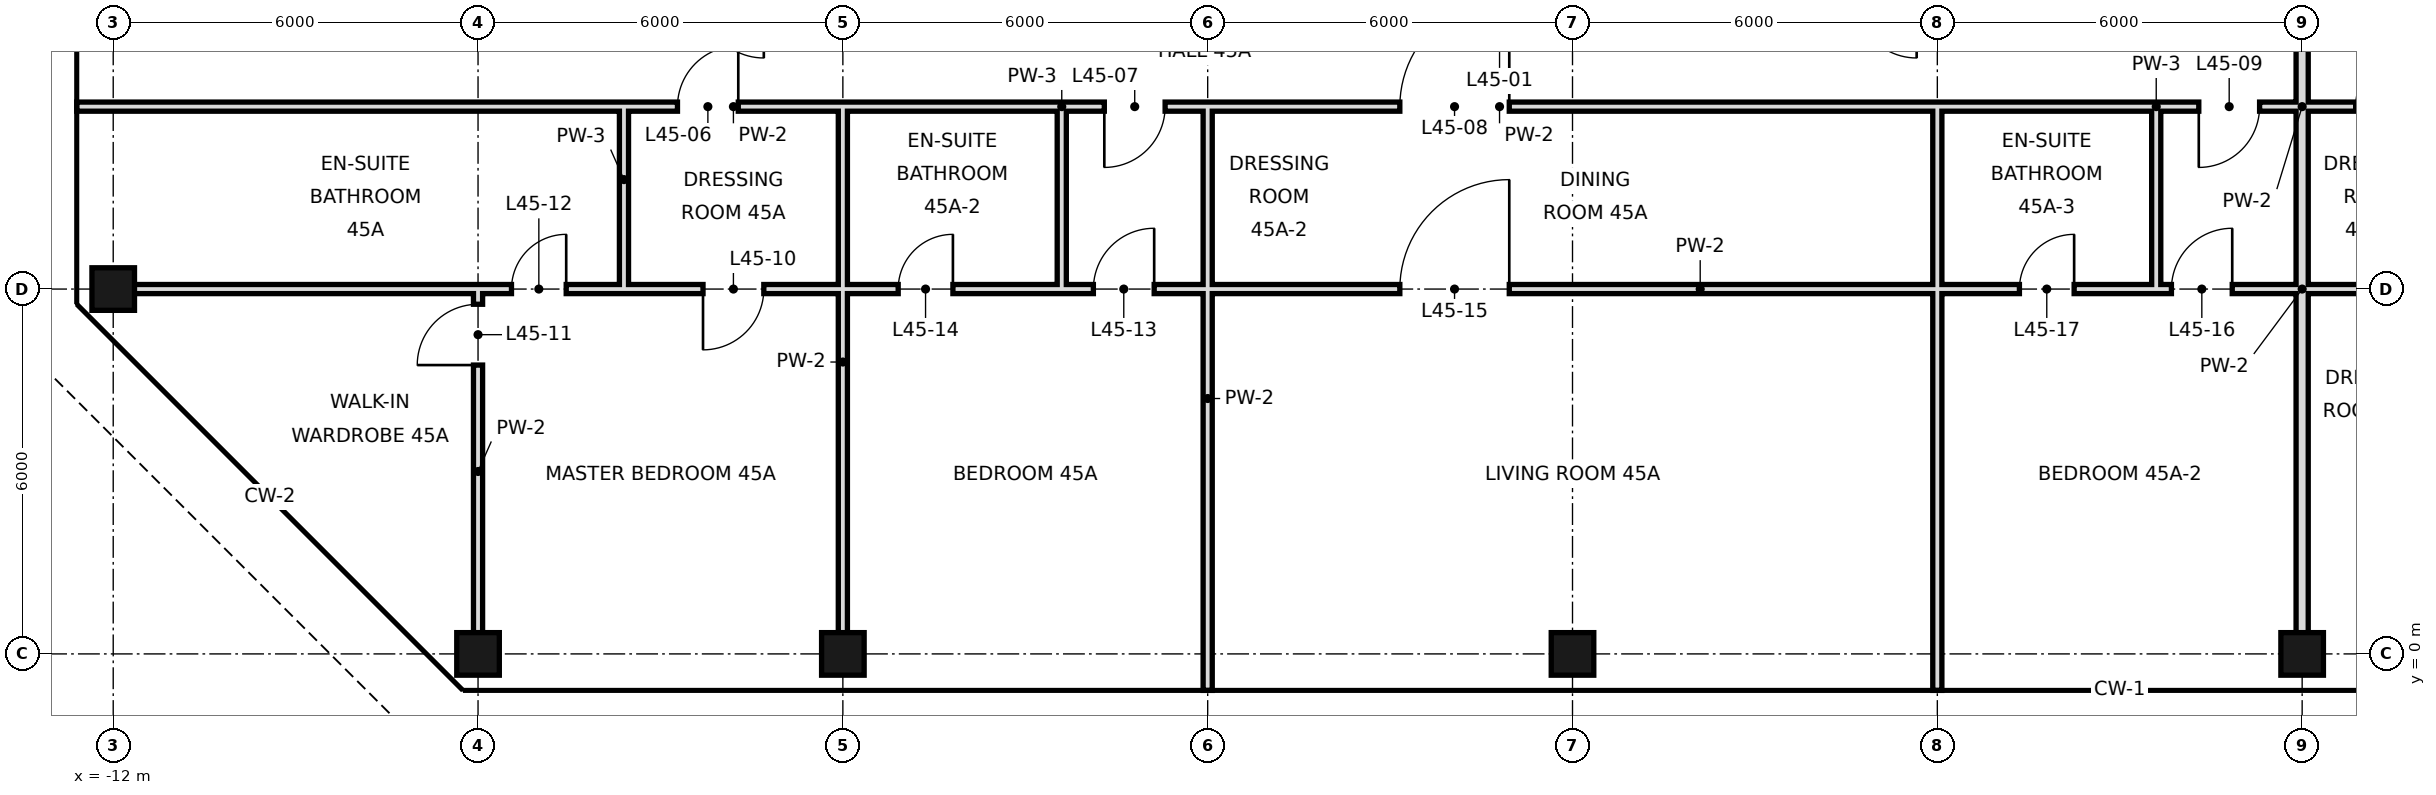
"""IFC4 building model, lengths in metres.
Left out: names, types, materials, properties, quantities, classifications, styles, units other than length and angle.
Written with IfcOpenShell. Run it as: python <this file> out.ifc"""

import sys

from ifc_helpers import new_model, si_unit, direction, frame, frame_2d, origin, origin_2d, place, context, subcontext, project, spatial, rectangle, hollow_rectangle, extrude, element, fill, save


model = new_model("IFC4")
c1 = context("Model", 3, precision=1e-05, world=origin(), true_north=direction((0.0, 1.0)))
c2 = subcontext(c1, "Body", "Model", "MODEL_VIEW")
j1 = project(units=[si_unit("LENGTHUNIT", "METRE"), si_unit("PLANEANGLEUNIT", "RADIAN")], contexts=[c1])
p1 = place(None, origin())
s1 = spatial("IfcSite", under=j1, at=p1, CompositionType="ELEMENT")
p2 = place(p1, origin())
s2 = spatial("IfcBuilding", under=s1, at=p2, CompositionType="ELEMENT")
p3 = place(p2, frame((0.0, 0.0, 195.6)))
s3 = spatial("IfcBuildingStorey", under=s2, at=p3, CompositionType="ELEMENT", Elevation=195.6)
for number, where, z_axis, x_axis in (
    (1, (-12.0, 6.0, 0.0), (0.0, 0.0, 1.0), (1.0, 0.0, 0.0)),
    (2, (-6.0, 0.0, 0.0), (0.0, 0.0, 1.0), (1.0, 0.0, 0.0)),
    (3, (0.0, 0.0, 0.0), (0.0, 0.0, 1.0), (1.0, 0.0, 0.0)),
    (4, (12.0, 0.0, 0.0), (0.0, 0.0, 1.0), (1.0, 0.0, 0.0)),
    (5, (24.0, 0.0, 0.0), (0.0, 0.0, 1.0), (1.0, 0.0, 0.0)),
):
    element("IfcColumn", number, at=place(p3, frame(where, z_axis=z_axis, x_axis=x_axis)), inside=s3, PredefinedType="COLUMN", context=c2, shape_type="SweptSolid", body=[
        extrude(hollow_rectangle(XDim=0.7, YDim=0.7, WallThickness=0.036, at=origin_2d()), origin(), (0.0, 0.0, 1.0), 3.6),
    ])
p4 = place(p3, frame((-3.6, 6.0, 0.0), z_axis=(0.0, 0.0, 1.0), x_axis=(0.0, 1.0, 0.0)))
e6 = element("IfcWall", 6, at=p4, inside=s3, PredefinedType="PARTITIONING", context=c2, shape_type="SweptSolid", body=[
    extrude(rectangle(XDim=3.0, YDim=0.15, at=frame_2d((1.5, 0.0))), origin(), (0.0, 0.0, 1.0), 3.42),
])
p5 = place(p3, frame((-6.0, 0.0, 0.0), z_axis=(0.0, 0.0, 1.0), x_axis=(0.0, 1.0, 0.0)))
e7 = element("IfcWall", 7, at=p5, inside=s3, PredefinedType="PARTITIONING", context=c2, shape_type="SweptSolid", body=[
    extrude(rectangle(XDim=6.0, YDim=0.15, at=frame_2d((3.0, 0.0))), origin(), (0.0, 0.0, 1.0), 3.42),
])
p6 = place(p5, frame((4.75, 0.0, 0.0)))
e8 = element("IfcOpeningElement", 8, at=p6, cuts=e7, PredefinedType="OPENING", context=c2, shape_type="SweptSolid", body=[
    extrude(rectangle(XDim=1.0, YDim=2.4, at=frame_2d((0.5, 1.2))), frame((0.0, 0.085, 0.0), z_axis=(0.0, -1.0, 0.0), x_axis=(1.0, 0.0, 0.0)), (0.0, 0.0, 1.0), 0.17),
])
p7 = place(p3, frame((0.0, 0.0, 0.0), z_axis=(0.0, 0.0, 1.0), x_axis=(0.0, 1.0, 0.0)))
e9 = element("IfcWall", 9, at=p7, inside=s3, PredefinedType="PARTITIONING", context=c2, shape_type="SweptSolid", body=[
    extrude(rectangle(XDim=6.0, YDim=0.15, at=frame_2d((3.0, 0.0))), origin(), (0.0, 0.0, 1.0), 2.72),
])
p8 = place(p3, frame((0.0, 6.0, 0.0), z_axis=(0.0, 0.0, 1.0), x_axis=(0.0, 1.0, 0.0)))
e10 = element("IfcWall", 10, at=p8, inside=s3, PredefinedType="PARTITIONING", context=c2, shape_type="SweptSolid", body=[
    extrude(rectangle(XDim=3.0, YDim=0.15, at=frame_2d((1.5, 0.0))), origin(), (0.0, 0.0, 1.0), 2.72),
])
p9 = place(p3, frame((18.0, -0.6, 0.0), z_axis=(0.0, 0.0, 1.0), x_axis=(0.0, 1.0, 0.0)))
e11 = element("IfcWall", 11, at=p9, inside=s3, PredefinedType="PARTITIONING", context=c2, shape_type="SweptSolid", body=[
    extrude(rectangle(XDim=6.6, YDim=0.15, at=frame_2d((3.3, 0.0))), origin(), (0.0, 0.0, 1.0), 2.72),
])
p10 = place(p3, frame((18.0, 6.0, 0.0), z_axis=(0.0, 0.0, 1.0), x_axis=(0.0, 1.0, 0.0)))
e12 = element("IfcWall", 12, at=p10, inside=s3, PredefinedType="PARTITIONING", context=c2, shape_type="SweptSolid", body=[
    extrude(rectangle(XDim=3.0, YDim=0.15, at=frame_2d((1.5, 0.0))), origin(), (0.0, 0.0, 1.0), 2.72),
])
p11 = place(p3, frame((21.6, 6.0, 0.0), z_axis=(0.0, 0.0, 1.0), x_axis=(0.0, 1.0, 0.0)))
e13 = element("IfcWall", 13, at=p11, inside=s3, PredefinedType="PARTITIONING", context=c2, shape_type="SweptSolid", body=[
    extrude(rectangle(XDim=3.0, YDim=0.15, at=frame_2d((1.5, 0.0))), origin(), (0.0, 0.0, 1.0), 3.42),
])
p12 = place(p3, frame((24.0, 0.0, 0.0), z_axis=(0.0, 0.0, 1.0), x_axis=(0.0, 1.0, 0.0)))
e14 = element("IfcWall", 14, at=p12, inside=s3, PredefinedType="SOLIDWALL", context=c2, shape_type="SweptSolid", body=[
    extrude(rectangle(XDim=15.3, YDim=0.2, at=frame_2d((7.65, 0.0))), origin(), (0.0, 0.0, 1.0), 2.72),
])
p13 = place(p3, frame((3.6, 6.0, 0.0), z_axis=(0.0, 0.0, 1.0), x_axis=(0.0, 1.0, 0.0)))
e15 = element("IfcWall", 15, at=p13, inside=s3, PredefinedType="PARTITIONING", context=c2, shape_type="SweptSolid", body=[
    extrude(rectangle(XDim=3.0, YDim=0.15, at=frame_2d((1.5, 0.0))), origin(), (0.0, 0.0, 1.0), 3.42),
])
p14 = place(p3, frame((6.0, -0.6, 0.0), z_axis=(0.0, 0.0, 1.0), x_axis=(0.0, 1.0, 0.0)))
e16 = element("IfcWall", 16, at=p14, inside=s3, PredefinedType="PARTITIONING", context=c2, shape_type="SweptSolid", body=[
    extrude(rectangle(XDim=9.6, YDim=0.15, at=frame_2d((4.8, 0.0))), origin(), (0.0, 0.0, 1.0), 2.72),
])
p15 = place(p3, frame((-3.6, 6.0, 0.0), z_axis=(0.0, 0.0, 1.0), x_axis=(1.0, 0.0, 0.0)))
e17 = element("IfcWall", 17, at=p15, inside=s3, PredefinedType="PARTITIONING", context=c2, shape_type="SweptSolid", body=[
    extrude(rectangle(XDim=3.6, YDim=0.15, at=frame_2d((1.8, 0.0))), origin(), (0.0, 0.0, 1.0), 2.72),
])
p16 = place(p15, frame((1.3, 0.0, 0.0)))
e18 = element("IfcOpeningElement", 18, at=p16, cuts=e17, PredefinedType="OPENING", context=c2, shape_type="SweptSolid", body=[
    extrude(rectangle(XDim=1.0, YDim=2.4, at=frame_2d((0.5, 1.2))), frame((0.0, 0.085, 0.0), z_axis=(0.0, -1.0, 0.0), x_axis=(1.0, 0.0, 0.0)), (0.0, 0.0, 1.0), 0.17),
])
p17 = place(p3, frame((3.6, 6.0, 0.0), z_axis=(0.0, 0.0, 1.0), x_axis=(1.0, 0.0, 0.0)))
e19 = element("IfcWall", 19, at=p17, inside=s3, PredefinedType="PARTITIONING", context=c2, shape_type="SweptSolid", body=[
    extrude(rectangle(XDim=14.4, YDim=0.15, at=frame_2d((7.2, 0.0))), origin(), (0.0, 0.0, 1.0), 2.97),
])
p18 = place(p17, frame((0.52, 0.0, 0.0)))
e20 = element("IfcOpeningElement", 20, at=p18, cuts=e19, PredefinedType="OPENING", context=c2, shape_type="SweptSolid", body=[
    extrude(rectangle(XDim=1.0, YDim=2.4, at=frame_2d((0.5, 1.2))), frame((0.0, 0.085, 0.0), z_axis=(0.0, -1.0, 0.0), x_axis=(1.0, 0.0, 0.0)), (0.0, 0.0, 1.0), 0.17),
])
p19 = place(p17, frame((5.56, 0.0, 0.0)))
e21 = element("IfcOpeningElement", 21, at=p19, cuts=e19, PredefinedType="OPENING", context=c2, shape_type="SweptSolid", body=[
    extrude(rectangle(XDim=1.8, YDim=2.4, at=frame_2d((0.9, 1.2))), frame((0.0, 0.085, 0.0), z_axis=(0.0, -1.0, 0.0), x_axis=(1.0, 0.0, 0.0)), (0.0, 0.0, 1.0), 0.17),
])
p20 = place(p3, frame((21.6, 6.0, 0.0), z_axis=(0.0, 0.0, 1.0), x_axis=(1.0, 0.0, 0.0)))
e22 = element("IfcWall", 22, at=p20, inside=s3, PredefinedType="PARTITIONING", context=c2, shape_type="SweptSolid", body=[
    extrude(rectangle(XDim=4.8, YDim=0.15, at=frame_2d((2.4, 0.0))), origin(), (0.0, 0.0, 1.0), 2.97),
])
p21 = place(p20, frame((0.25, 0.0, 0.0)))
e23 = element("IfcOpeningElement", 23, at=p21, cuts=e22, PredefinedType="OPENING", context=c2, shape_type="SweptSolid", body=[
    extrude(rectangle(XDim=1.0, YDim=2.4, at=frame_2d((0.5, 1.2))), frame((0.0, 0.085, 0.0), z_axis=(0.0, -1.0, 0.0), x_axis=(1.0, 0.0, 0.0)), (0.0, 0.0, 1.0), 0.17),
])
p22 = place(p20, frame((3.55, 0.0, 0.0)))
e24 = element("IfcOpeningElement", 24, at=p22, cuts=e22, PredefinedType="OPENING", context=c2, shape_type="SweptSolid", body=[
    extrude(rectangle(XDim=1.0, YDim=2.4, at=frame_2d((0.5, 1.2))), frame((0.0, 0.085, 0.0), z_axis=(0.0, -1.0, 0.0), x_axis=(1.0, 0.0, 0.0)), (0.0, 0.0, 1.0), 0.17),
])
p23 = place(p3, frame((-12.0, 6.0, 0.0), z_axis=(0.0, 0.0, 1.0), x_axis=(1.0, 0.0, 0.0)))
e25 = element("IfcWall", 25, at=p23, inside=s3, PredefinedType="PARTITIONING", context=c2, shape_type="SweptSolid", body=[
    extrude(rectangle(XDim=8.4, YDim=0.15, at=frame_2d((4.2, 0.0))), origin(), (0.0, 0.0, 1.0), 2.72),
])
p24 = place(p23, frame((6.55, 0.0, 0.0)))
e26 = element("IfcOpeningElement", 26, at=p24, cuts=e25, PredefinedType="OPENING", context=c2, shape_type="SweptSolid", body=[
    extrude(rectangle(XDim=0.9, YDim=2.4, at=frame_2d((0.45, 1.2))), frame((0.0, 0.085, 0.0), z_axis=(0.0, -1.0, 0.0), x_axis=(1.0, 0.0, 0.0)), (0.0, 0.0, 1.0), 0.17),
])
p25 = place(p3, frame((0.0, 6.0, 0.0), z_axis=(0.0, 0.0, 1.0), x_axis=(1.0, 0.0, 0.0)))
e27 = element("IfcWall", 27, at=p25, inside=s3, PredefinedType="PARTITIONING", context=c2, shape_type="SweptSolid", body=[
    extrude(rectangle(XDim=3.6, YDim=0.15, at=frame_2d((1.8, 0.0))), origin(), (0.0, 0.0, 1.0), 2.97),
])
p26 = place(p25, frame((0.91, 0.0, 0.0)))
e28 = element("IfcOpeningElement", 28, at=p26, cuts=e27, PredefinedType="OPENING", context=c2, shape_type="SweptSolid", body=[
    extrude(rectangle(XDim=0.9, YDim=2.4, at=frame_2d((0.45, 1.2))), frame((0.0, 0.085, 0.0), z_axis=(0.0, -1.0, 0.0), x_axis=(1.0, 0.0, 0.0)), (0.0, 0.0, 1.0), 0.17),
])
p27 = place(p3, frame((18.0, 6.0, 0.0), z_axis=(0.0, 0.0, 1.0), x_axis=(1.0, 0.0, 0.0)))
e29 = element("IfcWall", 29, at=p27, inside=s3, PredefinedType="PARTITIONING", context=c2, shape_type="SweptSolid", body=[
    extrude(rectangle(XDim=3.6, YDim=0.15, at=frame_2d((1.8, 0.0))), origin(), (0.0, 0.0, 1.0), 2.97),
])
p28 = place(p27, frame((1.35, 0.0, 0.0)))
e30 = element("IfcOpeningElement", 30, at=p28, cuts=e29, PredefinedType="OPENING", context=c2, shape_type="SweptSolid", body=[
    extrude(rectangle(XDim=0.9, YDim=2.4, at=frame_2d((0.45, 1.2))), frame((0.0, 0.085, 0.0), z_axis=(0.0, -1.0, 0.0), x_axis=(1.0, 0.0, 0.0)), (0.0, 0.0, 1.0), 0.17),
])
p29 = place(p3, frame((-3.6, 9.0, 0.0), z_axis=(0.0, 0.0, 1.0), x_axis=(1.0, 0.0, 0.0)))
e31 = element("IfcWall", 31, at=p29, inside=s3, PredefinedType="PARTITIONING", context=c2, shape_type="SweptSolid", body=[
    extrude(rectangle(XDim=3.6, YDim=0.15, at=frame_2d((1.8, 0.0))), origin(), (0.0, 0.0, 1.0), 3.42),
])
p30 = place(p29, frame((0.88, 0.0, 0.0)))
e32 = element("IfcOpeningElement", 32, at=p30, cuts=e31, PredefinedType="OPENING", context=c2, shape_type="SweptSolid", body=[
    extrude(rectangle(XDim=1.0, YDim=2.4, at=frame_2d((0.5, 1.2))), frame((0.0, 0.085, 0.0), z_axis=(0.0, -1.0, 0.0), x_axis=(1.0, 0.0, 0.0)), (0.0, 0.0, 1.0), 0.17),
])
p31 = place(p3, frame((3.6, 9.0, 0.0), z_axis=(0.0, 0.0, 1.0), x_axis=(1.0, 0.0, 0.0)))
e33 = element("IfcWall", 33, at=p31, inside=s3, PredefinedType="PARTITIONING", context=c2, shape_type="SweptSolid", body=[
    extrude(rectangle(XDim=14.4, YDim=0.15, at=frame_2d((7.2, 0.0))), origin(), (0.0, 0.0, 1.0), 3.42),
])
p32 = place(p31, frame((0.7, 0.0, 0.0)))
e34 = element("IfcOpeningElement", 34, at=p32, cuts=e33, PredefinedType="OPENING", context=c2, shape_type="SweptSolid", body=[
    extrude(rectangle(XDim=1.0, YDim=2.4, at=frame_2d((0.5, 1.2))), frame((0.0, 0.085, 0.0), z_axis=(0.0, -1.0, 0.0), x_axis=(1.0, 0.0, 0.0)), (0.0, 0.0, 1.0), 0.17),
])
p33 = place(p31, frame((5.56, 0.0, 0.0)))
e35 = element("IfcOpeningElement", 35, at=p33, cuts=e33, PredefinedType="OPENING", context=c2, shape_type="SweptSolid", body=[
    extrude(rectangle(XDim=1.8, YDim=2.4, at=frame_2d((0.9, 1.2))), frame((0.0, 0.085, 0.0), z_axis=(0.0, -1.0, 0.0), x_axis=(1.0, 0.0, 0.0)), (0.0, 0.0, 1.0), 0.17),
])
p34 = place(p3, frame((21.6, 9.0, 0.0), z_axis=(0.0, 0.0, 1.0), x_axis=(1.0, 0.0, 0.0)))
e36 = element("IfcWall", 36, at=p34, inside=s3, PredefinedType="PARTITIONING", context=c2, shape_type="SweptSolid", body=[
    extrude(rectangle(XDim=4.8, YDim=0.15, at=frame_2d((2.4, 0.0))), origin(), (0.0, 0.0, 1.0), 3.42),
])
p35 = place(p34, frame((0.7, 0.0, 0.0)))
e37 = element("IfcOpeningElement", 37, at=p35, cuts=e36, PredefinedType="OPENING", context=c2, shape_type="SweptSolid", body=[
    extrude(rectangle(XDim=1.0, YDim=2.4, at=frame_2d((0.5, 1.2))), frame((0.0, 0.085, 0.0), z_axis=(0.0, -1.0, 0.0), x_axis=(1.0, 0.0, 0.0)), (0.0, 0.0, 1.0), 0.17),
])
p36 = place(p34, frame((3.28, 0.0, 0.0)))
e38 = element("IfcOpeningElement", 38, at=p36, cuts=e36, PredefinedType="OPENING", context=c2, shape_type="SweptSolid", body=[
    extrude(rectangle(XDim=1.0, YDim=2.4, at=frame_2d((0.5, 1.2))), frame((0.0, 0.085, 0.0), z_axis=(0.0, -1.0, 0.0), x_axis=(1.0, 0.0, 0.0)), (0.0, 0.0, 1.0), 0.17),
])
p37 = place(p3, frame((-12.6, 9.0, 0.0), z_axis=(0.0, 0.0, 1.0), x_axis=(1.0, 0.0, 0.0)))
e39 = element("IfcWall", 39, at=p37, inside=s3, PredefinedType="PARTITIONING", context=c2, shape_type="SweptSolid", body=[
    extrude(rectangle(XDim=9.0, YDim=0.15, at=frame_2d((4.5, 0.0))), origin(), (0.0, 0.0, 1.0), 3.42),
])
for number, where, z_axis, x_axis in (
    (40, (0.0, 9.0, 0.0), (0.0, 0.0, 1.0), (1.0, 0.0, 0.0)),
    (41, (18.0, 9.0, 0.0), (0.0, 0.0, 1.0), (1.0, 0.0, 0.0)),
):
    element("IfcWall", number, at=place(p3, frame(where, z_axis=z_axis, x_axis=x_axis)), inside=s3, PredefinedType="PARTITIONING", context=c2, shape_type="SweptSolid", body=[
        extrude(rectangle(XDim=3.6, YDim=0.15, at=frame_2d((1.8, 0.0))), origin(), (0.0, 0.0, 1.0), 3.42),
    ])
p38 = place(p30, frame((1.0, 0.0, 0.0), z_axis=(0.0, 0.0, 1.0), x_axis=(-1.0, 0.0, 0.0)))
e42 = element("IfcDoor", 42, at=p38, inside=s3, OperationType="SINGLE_SWING_LEFT", PredefinedType="DOOR", context=c2, shape_type="SweptSolid", body=[
    extrude(rectangle(XDim=1.0, YDim=2.4, at=frame_2d((0.5, 1.2))), frame((0.0, 0.025, 0.0), z_axis=(0.0, -1.0, 0.0), x_axis=(1.0, 0.0, 0.0)), (0.0, 0.0, 1.0), 0.05),
])
fill(e32, e42)
p39 = place(p32, frame((1.0, 0.0, 0.0), z_axis=(0.0, 0.0, 1.0), x_axis=(-1.0, 0.0, 0.0)))
e43 = element("IfcDoor", 43, at=p39, inside=s3, OperationType="SINGLE_SWING_RIGHT", PredefinedType="DOOR", context=c2, shape_type="SweptSolid", body=[
    extrude(rectangle(XDim=1.0, YDim=2.4, at=frame_2d((0.5, 1.2))), frame((0.0, 0.025, 0.0), z_axis=(0.0, -1.0, 0.0), x_axis=(1.0, 0.0, 0.0)), (0.0, 0.0, 1.0), 0.05),
])
fill(e34, e43)
p40 = place(p33, frame((1.8, 0.0, 0.0), z_axis=(0.0, 0.0, 1.0), x_axis=(-1.0, 0.0, 0.0)))
e44 = element("IfcDoor", 44, at=p40, inside=s3, OperationType="SINGLE_SWING_LEFT", PredefinedType="DOOR", context=c2, shape_type="SweptSolid", body=[
    extrude(rectangle(XDim=1.8, YDim=2.4, at=frame_2d((0.9, 1.2))), frame((0.0, 0.025, 0.0), z_axis=(0.0, -1.0, 0.0), x_axis=(1.0, 0.0, 0.0)), (0.0, 0.0, 1.0), 0.05),
])
fill(e35, e44)
p41 = place(p35, frame((1.0, 0.0, 0.0), z_axis=(0.0, 0.0, 1.0), x_axis=(-1.0, 0.0, 0.0)))
e45 = element("IfcDoor", 45, at=p41, inside=s3, OperationType="SINGLE_SWING_RIGHT", PredefinedType="DOOR", context=c2, shape_type="SweptSolid", body=[
    extrude(rectangle(XDim=1.0, YDim=2.4, at=frame_2d((0.5, 1.2))), frame((0.0, 0.025, 0.0), z_axis=(0.0, -1.0, 0.0), x_axis=(1.0, 0.0, 0.0)), (0.0, 0.0, 1.0), 0.05),
])
fill(e37, e45)
p42 = place(p16, frame((1.0, 0.0, 0.0), z_axis=(0.0, 0.0, 1.0), x_axis=(-1.0, 0.0, 0.0)))
e46 = element("IfcDoor", 46, at=p42, inside=s3, OperationType="SINGLE_SWING_RIGHT", PredefinedType="DOOR", context=c2, shape_type="SweptSolid", body=[
    extrude(rectangle(XDim=1.0, YDim=2.4, at=frame_2d((0.5, 1.2))), frame((0.0, 0.025, 0.0), z_axis=(0.0, -1.0, 0.0), x_axis=(1.0, 0.0, 0.0)), (0.0, 0.0, 1.0), 0.05),
])
fill(e18, e46)
p43 = place(p6, origin())
e47 = element("IfcDoor", 47, at=p43, inside=s3, OperationType="SINGLE_SWING_LEFT", PredefinedType="DOOR", context=c2, shape_type="SweptSolid", body=[
    extrude(rectangle(XDim=1.0, YDim=2.4, at=frame_2d((0.5, 1.2))), frame((0.0, 0.025, 0.0), z_axis=(0.0, -1.0, 0.0), x_axis=(1.0, 0.0, 0.0)), (0.0, 0.0, 1.0), 0.05),
])
fill(e8, e47)
p44 = place(p24, frame((0.9, 0.0, 0.0), z_axis=(0.0, 0.0, 1.0), x_axis=(-1.0, 0.0, 0.0)))
e48 = element("IfcDoor", 48, at=p44, inside=s3, OperationType="SINGLE_SWING_LEFT", PredefinedType="DOOR", context=c2, shape_type="SweptSolid", body=[
    extrude(rectangle(XDim=0.9, YDim=2.4, at=frame_2d((0.45, 1.2))), frame((0.0, 0.025, 0.0), z_axis=(0.0, -1.0, 0.0), x_axis=(1.0, 0.0, 0.0)), (0.0, 0.0, 1.0), 0.05),
])
fill(e26, e48)
p45 = place(p18, frame((1.0, 0.0, 0.0), z_axis=(0.0, 0.0, 1.0), x_axis=(-1.0, 0.0, 0.0)))
e49 = element("IfcDoor", 49, at=p45, inside=s3, OperationType="SINGLE_SWING_LEFT", PredefinedType="DOOR", context=c2, shape_type="SweptSolid", body=[
    extrude(rectangle(XDim=1.0, YDim=2.4, at=frame_2d((0.5, 1.2))), frame((0.0, 0.025, 0.0), z_axis=(0.0, -1.0, 0.0), x_axis=(1.0, 0.0, 0.0)), (0.0, 0.0, 1.0), 0.05),
])
fill(e20, e49)
p46 = place(p26, frame((0.9, 0.0, 0.0), z_axis=(0.0, 0.0, 1.0), x_axis=(-1.0, 0.0, 0.0)))
e50 = element("IfcDoor", 50, at=p46, inside=s3, OperationType="SINGLE_SWING_LEFT", PredefinedType="DOOR", context=c2, shape_type="SweptSolid", body=[
    extrude(rectangle(XDim=0.9, YDim=2.4, at=frame_2d((0.45, 1.2))), frame((0.0, 0.025, 0.0), z_axis=(0.0, -1.0, 0.0), x_axis=(1.0, 0.0, 0.0)), (0.0, 0.0, 1.0), 0.05),
])
fill(e28, e50)
p47 = place(p19, frame((1.8, 0.0, 0.0), z_axis=(0.0, 0.0, 1.0), x_axis=(-1.0, 0.0, 0.0)))
e51 = element("IfcDoor", 51, at=p47, inside=s3, OperationType="SINGLE_SWING_LEFT", PredefinedType="DOOR", context=c2, shape_type="SweptSolid", body=[
    extrude(rectangle(XDim=1.8, YDim=2.4, at=frame_2d((0.9, 1.2))), frame((0.0, 0.025, 0.0), z_axis=(0.0, -1.0, 0.0), x_axis=(1.0, 0.0, 0.0)), (0.0, 0.0, 1.0), 0.05),
])
fill(e21, e51)
p48 = place(p21, frame((1.0, 0.0, 0.0), z_axis=(0.0, 0.0, 1.0), x_axis=(-1.0, 0.0, 0.0)))
e52 = element("IfcDoor", 52, at=p48, inside=s3, OperationType="SINGLE_SWING_LEFT", PredefinedType="DOOR", context=c2, shape_type="SweptSolid", body=[
    extrude(rectangle(XDim=1.0, YDim=2.4, at=frame_2d((0.5, 1.2))), frame((0.0, 0.025, 0.0), z_axis=(0.0, -1.0, 0.0), x_axis=(1.0, 0.0, 0.0)), (0.0, 0.0, 1.0), 0.05),
])
fill(e23, e52)
p49 = place(p28, frame((0.9, 0.0, 0.0), z_axis=(0.0, 0.0, 1.0), x_axis=(-1.0, 0.0, 0.0)))
e53 = element("IfcDoor", 53, at=p49, inside=s3, OperationType="SINGLE_SWING_LEFT", PredefinedType="DOOR", context=c2, shape_type="SweptSolid", body=[
    extrude(rectangle(XDim=0.9, YDim=2.4, at=frame_2d((0.45, 1.2))), frame((0.0, 0.025, 0.0), z_axis=(0.0, -1.0, 0.0), x_axis=(1.0, 0.0, 0.0)), (0.0, 0.0, 1.0), 0.05),
])
fill(e30, e53)
p50 = place(p36, frame((1.0, 0.0, 0.0), z_axis=(0.0, 0.0, 1.0), x_axis=(-1.0, 0.0, 0.0)))
e54 = element("IfcDoor", 54, at=p50, inside=s3, OperationType="SINGLE_SWING_LEFT", PredefinedType="DOOR", context=c2, shape_type="SweptSolid", body=[
    extrude(rectangle(XDim=1.0, YDim=2.4, at=frame_2d((0.5, 1.2))), frame((0.0, 0.025, 0.0), z_axis=(0.0, -1.0, 0.0), x_axis=(1.0, 0.0, 0.0)), (0.0, 0.0, 1.0), 0.05),
])
fill(e38, e54)
save(model, sys.argv[1])
